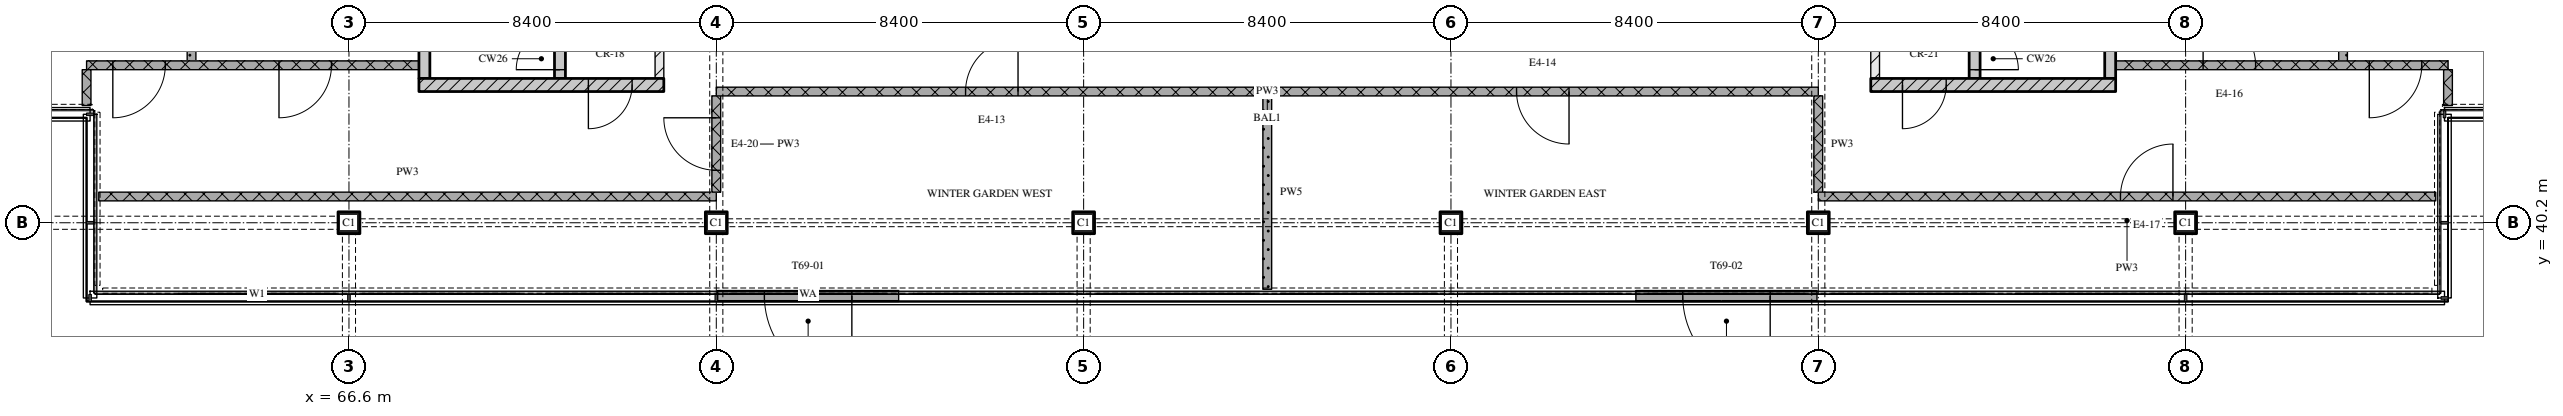
"""IFC4 building model, lengths in metres.
Left out: names, types, materials, properties, quantities, classifications, styles, units other than length and angle.
Written with IfcOpenShell. Run it as: python <this file> out.ifc"""

import sys

from ifc_helpers import new_model, si_unit, direction, frame, frame_2d, origin, origin_2d, place, context, subcontext, project, spatial, rectangle, extrude, element, fill, save


model = new_model("IFC4")
c1 = context("Model", 3, precision=1e-05, world=origin(), true_north=direction((0.0, 1.0)))
c2 = subcontext(c1, "Body", "Model", "MODEL_VIEW")
j1 = project(units=[si_unit("LENGTHUNIT", "METRE"), si_unit("PLANEANGLEUNIT", "RADIAN")], contexts=[c1])
p1 = place(None, origin())
s1 = spatial("IfcSite", under=j1, at=p1, CompositionType="ELEMENT")
p2 = place(p1, origin())
s2 = spatial("IfcBuilding", under=s1, at=p2, CompositionType="ELEMENT")
p3 = place(p2, frame((0.0, 0.0, 285.15)))
s3 = spatial("IfcBuildingStorey", under=s2, at=p3, CompositionType="ELEMENT", Elevation=285.15)
for number, where, z_axis, x_axis in (
    (1, (66.6, 40.2, 0.0), (0.0, 0.0, 1.0), (1.0, 0.0, 0.0)),
    (2, (75.0, 40.2, 0.0), (0.0, 0.0, 1.0), (1.0, 0.0, 0.0)),
    (3, (83.4, 40.2, 0.0), (0.0, 0.0, 1.0), (1.0, 0.0, 0.0)),
    (4, (91.8, 40.2, 0.0), (0.0, 0.0, 1.0), (1.0, 0.0, 0.0)),
    (5, (100.2, 40.2, 0.0), (0.0, 0.0, 1.0), (1.0, 0.0, 0.0)),
    (6, (108.6, 40.2, 0.0), (0.0, 0.0, 1.0), (1.0, 0.0, 0.0)),
):
    element("IfcColumn", number, at=place(p3, frame(where, z_axis=z_axis, x_axis=x_axis)), inside=s3, PredefinedType="COLUMN", context=c2, shape_type="SweptSolid", body=[
        extrude(rectangle(XDim=0.5, YDim=0.5, at=origin_2d()), origin(), (0.0, 0.0, 1.0), 3.6),
    ])
p4 = place(p3, frame((79.17, 38.525, 0.0), z_axis=(0.0, 0.0, 1.0), x_axis=(-1.0, 0.0, 0.0)))
e7 = element("IfcWall", 7, at=p4, inside=s3, PredefinedType="SOLIDWALL", context=c2, shape_type="SweptSolid", body=[
    extrude(rectangle(XDim=4.14, YDim=0.25, at=frame_2d((2.07, 0.0))), origin(), (0.0, 0.0, 1.0), 3.32),
])
p5 = place(p4, frame((1.07, 0.0, 0.0)))
e8 = element("IfcOpeningElement", 8, at=p5, cuts=e7, PredefinedType="OPENING", context=c2, shape_type="SweptSolid", body=[
    extrude(rectangle(XDim=2.0, YDim=2.4, at=frame_2d((1.0, 1.2))), frame((0.0, 0.135, 0.0), z_axis=(0.0, -1.0, 0.0), x_axis=(1.0, 0.0, 0.0)), (0.0, 0.0, 1.0), 0.27),
])
p6 = place(p3, frame((100.17, 38.525, 0.0), z_axis=(0.0, 0.0, 1.0), x_axis=(-1.0, 0.0, 0.0)))
e9 = element("IfcWall", 9, at=p6, inside=s3, PredefinedType="SOLIDWALL", context=c2, shape_type="SweptSolid", body=[
    extrude(rectangle(XDim=4.14, YDim=0.25, at=frame_2d((2.07, 0.0))), origin(), (0.0, 0.0, 1.0), 3.32),
])
p7 = place(p6, frame((1.07, 0.0, 0.0)))
e10 = element("IfcOpeningElement", 10, at=p7, cuts=e9, PredefinedType="OPENING", context=c2, shape_type="SweptSolid", body=[
    extrude(rectangle(XDim=2.0, YDim=2.4, at=frame_2d((1.0, 1.2))), frame((0.0, 0.135, 0.0), z_axis=(0.0, -1.0, 0.0), x_axis=(1.0, 0.0, 0.0)), (0.0, 0.0, 1.0), 0.27),
])
p8 = place(p3, frame((68.2, 43.35, 0.0), z_axis=(0.0, 0.0, 1.0), x_axis=(1.0, 0.0, 0.0)))
e11 = element("IfcWall", 11, at=p8, inside=s3, PredefinedType="SOLIDWALL", context=c2, shape_type="SweptSolid", body=[
    extrude(rectangle(XDim=5.6, YDim=0.3, at=frame_2d((2.8, 0.0))), origin(), (0.0, 0.0, 1.0), 3.32),
])
p9 = place(p8, frame((3.875, 0.0, 0.0)))
e12 = element("IfcOpeningElement", 12, at=p9, cuts=e11, PredefinedType="OPENING", context=c2, shape_type="SweptSolid", body=[
    extrude(rectangle(XDim=1.0, YDim=2.1, at=frame_2d((0.5, 1.05))), frame((0.0, 0.16, 0.0), z_axis=(0.0, -1.0, 0.0), x_axis=(1.0, 0.0, 0.0)), (0.0, 0.0, 1.0), 0.32),
])
p10 = place(p3, frame((68.325, 43.5, 0.0), z_axis=(0.0, 0.0, 1.0), x_axis=(0.0, 1.0, 0.0)))
e13 = element("IfcWall", 13, at=p10, inside=s3, PredefinedType="SOLIDWALL", context=c2, shape_type="SweptSolid", body=[
    extrude(rectangle(XDim=6.9, YDim=0.25, at=frame_2d((3.45, 0.0))), origin(), (0.0, 0.0, 1.0), 3.32),
])
p11 = place(p3, frame((71.425, 43.5, 0.0), z_axis=(0.0, 0.0, 1.0), x_axis=(0.0, 1.0, 0.0)))
e14 = element("IfcWall", 14, at=p11, inside=s3, PredefinedType="SOLIDWALL", context=c2, shape_type="SweptSolid", body=[
    extrude(rectangle(XDim=6.9, YDim=0.25, at=frame_2d((3.45, 0.0))), origin(), (0.0, 0.0, 1.0), 3.32),
])
p12 = place(p11, frame((0.2, 0.0, 0.0)))
e15 = element("IfcOpeningElement", 15, at=p12, cuts=e14, PredefinedType="OPENING", context=c2, shape_type="SweptSolid", body=[
    extrude(rectangle(XDim=1.0, YDim=2.1, at=frame_2d((0.5, 1.05))), frame((0.0, 0.135, 0.0), z_axis=(0.0, -1.0, 0.0), x_axis=(1.0, 0.0, 0.0)), (0.0, 0.0, 1.0), 0.27),
])
p13 = place(p3, frame((73.7, 43.5, 0.0), z_axis=(0.0, 0.0, 1.0), x_axis=(0.0, 1.0, 0.0)))
e16 = element("IfcWall", 16, at=p13, inside=s3, PredefinedType="PARTITIONING", context=c2, shape_type="SweptSolid", body=[
    extrude(rectangle(XDim=6.9, YDim=0.2, at=frame_2d((3.45, 0.0))), origin(), (0.0, 0.0, 1.0), 3.32),
])
p14 = place(p13, frame((1.0, 0.0, 0.0)))
e17 = element("IfcOpeningElement", 17, at=p14, cuts=e16, PredefinedType="OPENING", context=c2, shape_type="SweptSolid", body=[
    extrude(rectangle(XDim=1.0, YDim=2.1, at=frame_2d((0.5, 1.05))), frame((0.0, 0.11, 0.0), z_axis=(0.0, -1.0, 0.0), x_axis=(1.0, 0.0, 0.0)), (0.0, 0.0, 1.0), 0.22),
])
p15 = place(p3, frame((101.4, 43.35, 0.0), z_axis=(0.0, 0.0, 1.0), x_axis=(1.0, 0.0, 0.0)))
e18 = element("IfcWall", 18, at=p15, inside=s3, PredefinedType="SOLIDWALL", context=c2, shape_type="SweptSolid", body=[
    extrude(rectangle(XDim=5.6, YDim=0.3, at=frame_2d((2.8, 0.0))), origin(), (0.0, 0.0, 1.0), 3.32),
])
p16 = place(p15, frame((0.725, 0.0, 0.0)))
e19 = element("IfcOpeningElement", 19, at=p16, cuts=e18, PredefinedType="OPENING", context=c2, shape_type="SweptSolid", body=[
    extrude(rectangle(XDim=1.0, YDim=2.1, at=frame_2d((0.5, 1.05))), frame((0.0, 0.16, 0.0), z_axis=(0.0, -1.0, 0.0), x_axis=(1.0, 0.0, 0.0)), (0.0, 0.0, 1.0), 0.32),
])
p17 = place(p3, frame((101.5, 43.5, 0.0), z_axis=(0.0, 0.0, 1.0), x_axis=(0.0, 1.0, 0.0)))
e20 = element("IfcWall", 20, at=p17, inside=s3, PredefinedType="PARTITIONING", context=c2, shape_type="SweptSolid", body=[
    extrude(rectangle(XDim=6.9, YDim=0.2, at=frame_2d((3.45, 0.0))), origin(), (0.0, 0.0, 1.0), 3.32),
])
p18 = place(p17, frame((1.0, 0.0, 0.0)))
e21 = element("IfcOpeningElement", 21, at=p18, cuts=e20, PredefinedType="OPENING", context=c2, shape_type="SweptSolid", body=[
    extrude(rectangle(XDim=1.0, YDim=2.1, at=frame_2d((0.5, 1.05))), frame((0.0, 0.11, 0.0), z_axis=(0.0, -1.0, 0.0), x_axis=(1.0, 0.0, 0.0)), (0.0, 0.0, 1.0), 0.22),
])
p19 = place(p3, frame((103.775, 43.5, 0.0), z_axis=(0.0, 0.0, 1.0), x_axis=(0.0, 1.0, 0.0)))
e22 = element("IfcWall", 22, at=p19, inside=s3, PredefinedType="SOLIDWALL", context=c2, shape_type="SweptSolid", body=[
    extrude(rectangle(XDim=6.9, YDim=0.25, at=frame_2d((3.45, 0.0))), origin(), (0.0, 0.0, 1.0), 3.32),
])
p20 = place(p19, frame((0.2, 0.0, 0.0)))
e23 = element("IfcOpeningElement", 23, at=p20, cuts=e22, PredefinedType="OPENING", context=c2, shape_type="SweptSolid", body=[
    extrude(rectangle(XDim=1.0, YDim=2.1, at=frame_2d((0.5, 1.05))), frame((0.0, 0.135, 0.0), z_axis=(0.0, -1.0, 0.0), x_axis=(1.0, 0.0, 0.0)), (0.0, 0.0, 1.0), 0.27),
])
p21 = place(p3, frame((106.875, 43.5, 0.0), z_axis=(0.0, 0.0, 1.0), x_axis=(0.0, 1.0, 0.0)))
e24 = element("IfcWall", 24, at=p21, inside=s3, PredefinedType="SOLIDWALL", context=c2, shape_type="SweptSolid", body=[
    extrude(rectangle(XDim=6.9, YDim=0.25, at=frame_2d((3.45, 0.0))), origin(), (0.0, 0.0, 1.0), 3.32),
])
p22 = place(p3, frame((60.88, 40.8, 0.0), z_axis=(0.0, 0.0, 1.0), x_axis=(1.0, 0.0, 0.0)))
e25 = element("IfcWall", 25, at=p22, inside=s3, PredefinedType="PARTITIONING", context=c2, shape_type="SweptSolid", body=[
    extrude(rectangle(XDim=14.12, YDim=0.2, at=frame_2d((7.06, 0.0))), origin(), (0.0, 0.0, 1.0), 3.32),
])
p23 = place(p3, frame((114.32, 40.8, 0.0), z_axis=(0.0, 0.0, 1.0), x_axis=(-1.0, 0.0, 0.0)))
e26 = element("IfcWall", 26, at=p23, inside=s3, PredefinedType="PARTITIONING", context=c2, shape_type="SweptSolid", body=[
    extrude(rectangle(XDim=14.12, YDim=0.2, at=frame_2d((7.06, 0.0))), origin(), (0.0, 0.0, 1.0), 3.32),
])
p24 = place(p23, frame((6.01, 0.0, 0.0)))
e27 = element("IfcOpeningElement", 27, at=p24, cuts=e26, PredefinedType="OPENING", context=c2, shape_type="SweptSolid", body=[
    extrude(rectangle(XDim=1.2, YDim=2.1, at=frame_2d((0.6, 1.05))), frame((0.0, 0.11, 0.0), z_axis=(0.0, -1.0, 0.0), x_axis=(1.0, 0.0, 0.0)), (0.0, 0.0, 1.0), 0.22),
])
p25 = place(p3, frame((100.2, 43.2, 0.0), z_axis=(0.0, 0.0, 1.0), x_axis=(-1.0, 0.0, 0.0)))
e28 = element("IfcWall", 28, at=p25, inside=s3, PredefinedType="PARTITIONING", context=c2, shape_type="SweptSolid", body=[
    extrude(rectangle(XDim=25.2, YDim=0.2, at=frame_2d((12.6, 0.0))), origin(), (0.0, 0.0, 1.0), 3.32),
])
p26 = place(p25, frame((5.7, 0.0, 0.0)))
e29 = element("IfcOpeningElement", 29, at=p26, cuts=e28, PredefinedType="OPENING", context=c2, shape_type="SweptSolid", body=[
    extrude(rectangle(XDim=1.2, YDim=2.1, at=frame_2d((0.6, 1.05))), frame((0.0, 0.11, 0.0), z_axis=(0.0, -1.0, 0.0), x_axis=(1.0, 0.0, 0.0)), (0.0, 0.0, 1.0), 0.22),
])
p27 = place(p25, frame((18.3, 0.0, 0.0)))
e30 = element("IfcOpeningElement", 30, at=p27, cuts=e28, PredefinedType="OPENING", context=c2, shape_type="SweptSolid", body=[
    extrude(rectangle(XDim=1.2, YDim=2.1, at=frame_2d((0.6, 1.05))), frame((0.0, 0.11, 0.0), z_axis=(0.0, -1.0, 0.0), x_axis=(1.0, 0.0, 0.0)), (0.0, 0.0, 1.0), 0.22),
])
p28 = place(p3, frame((60.6, 43.8, 0.0), z_axis=(0.0, 0.0, 1.0), x_axis=(1.0, 0.0, 0.0)))
e31 = element("IfcWall", 31, at=p28, inside=s3, PredefinedType="PARTITIONING", context=c2, shape_type="SweptSolid", body=[
    extrude(rectangle(XDim=7.6, YDim=0.2, at=frame_2d((3.8, 0.0))), origin(), (0.0, 0.0, 1.0), 3.32),
])
p29 = place(p28, frame((0.6, 0.0, 0.0)))
e32 = element("IfcOpeningElement", 32, at=p29, cuts=e31, PredefinedType="OPENING", context=c2, shape_type="SweptSolid", body=[
    extrude(rectangle(XDim=1.2, YDim=2.1, at=frame_2d((0.6, 1.05))), frame((0.0, 0.11, 0.0), z_axis=(0.0, -1.0, 0.0), x_axis=(1.0, 0.0, 0.0)), (0.0, 0.0, 1.0), 0.22),
])
p30 = place(p28, frame((4.4, 0.0, 0.0)))
e33 = element("IfcOpeningElement", 33, at=p30, cuts=e31, PredefinedType="OPENING", context=c2, shape_type="SweptSolid", body=[
    extrude(rectangle(XDim=1.2, YDim=2.1, at=frame_2d((0.6, 1.05))), frame((0.0, 0.11, 0.0), z_axis=(0.0, -1.0, 0.0), x_axis=(1.0, 0.0, 0.0)), (0.0, 0.0, 1.0), 0.22),
])
p31 = place(p3, frame((107.0, 43.8, 0.0), z_axis=(0.0, 0.0, 1.0), x_axis=(1.0, 0.0, 0.0)))
e34 = element("IfcWall", 34, at=p31, inside=s3, PredefinedType="PARTITIONING", context=c2, shape_type="SweptSolid", body=[
    extrude(rectangle(XDim=7.6, YDim=0.2, at=frame_2d((3.8, 0.0))), origin(), (0.0, 0.0, 1.0), 3.32),
])
p32 = place(p31, frame((2.0, 0.0, 0.0)))
e35 = element("IfcOpeningElement", 35, at=p32, cuts=e34, PredefinedType="OPENING", context=c2, shape_type="SweptSolid", body=[
    extrude(rectangle(XDim=1.2, YDim=2.1, at=frame_2d((0.6, 1.05))), frame((0.0, 0.11, 0.0), z_axis=(0.0, -1.0, 0.0), x_axis=(1.0, 0.0, 0.0)), (0.0, 0.0, 1.0), 0.22),
])
p33 = place(p31, frame((5.8, 0.0, 0.0)))
e36 = element("IfcOpeningElement", 36, at=p33, cuts=e34, PredefinedType="OPENING", context=c2, shape_type="SweptSolid", body=[
    extrude(rectangle(XDim=1.2, YDim=2.1, at=frame_2d((0.6, 1.05))), frame((0.0, 0.11, 0.0), z_axis=(0.0, -1.0, 0.0), x_axis=(1.0, 0.0, 0.0)), (0.0, 0.0, 1.0), 0.22),
])
p34 = place(p3, frame((60.6, 43.7, 0.0), z_axis=(0.0, 0.0, 1.0), x_axis=(0.0, -1.0, 0.0)))
e37 = element("IfcWall", 37, at=p34, inside=s3, PredefinedType="PARTITIONING", context=c2, shape_type="SweptSolid", body=[
    extrude(rectangle(XDim=0.82, YDim=0.2, at=frame_2d((0.41, 0.0))), origin(), (0.0, 0.0, 1.0), 3.32),
])
p35 = place(p3, frame((63.0, 52.4, 0.0), z_axis=(0.0, 0.0, 1.0), x_axis=(0.0, -1.0, 0.0)))
e38 = element("IfcWall", 38, at=p35, inside=s3, PredefinedType="PARTITIONING", context=c2, shape_type="SweptSolid", body=[
    extrude(rectangle(XDim=8.5, YDim=0.2, at=frame_2d((4.25, 0.0))), origin(), (0.0, 0.0, 1.0), 3.32),
])
p36 = place(p3, frame((75.0, 43.1, 0.0), z_axis=(0.0, 0.0, 1.0), x_axis=(0.0, -1.0, 0.0)))
e39 = element("IfcWall", 39, at=p36, inside=s3, PredefinedType="PARTITIONING", context=c2, shape_type="SweptSolid", body=[
    extrude(rectangle(XDim=2.2, YDim=0.2, at=frame_2d((1.1, 0.0))), origin(), (0.0, 0.0, 1.0), 2.53),
])
p37 = place(p36, frame((0.5, 0.0, 0.0)))
e40 = element("IfcOpeningElement", 40, at=p37, cuts=e39, PredefinedType="OPENING", context=c2, shape_type="SweptSolid", body=[
    extrude(rectangle(XDim=1.2, YDim=2.1, at=frame_2d((0.6, 1.05))), frame((0.0, 0.11, 0.0), z_axis=(0.0, -1.0, 0.0), x_axis=(1.0, 0.0, 0.0)), (0.0, 0.0, 1.0), 0.22),
])
p38 = place(p3, frame((87.6, 43.1, 0.0), z_axis=(0.0, 0.0, 1.0), x_axis=(0.0, -1.0, 0.0)))
e41 = element("IfcWall", 41, at=p38, inside=s3, PredefinedType="PARTITIONING", context=c2, shape_type="SweptSolid", body=[
    extrude(rectangle(XDim=4.42, YDim=0.2, at=frame_2d((2.21, 0.0))), origin(), (0.0, 0.0, 1.0), 3.32),
])
p39 = place(p3, frame((100.2, 43.1, 0.0), z_axis=(0.0, 0.0, 1.0), x_axis=(0.0, -1.0, 0.0)))
e42 = element("IfcWall", 42, at=p39, inside=s3, PredefinedType="PARTITIONING", context=c2, shape_type="SweptSolid", body=[
    extrude(rectangle(XDim=2.2, YDim=0.2, at=frame_2d((1.1, 0.0))), origin(), (0.0, 0.0, 1.0), 2.53),
])
p40 = place(p3, frame((112.2, 52.4, 0.0), z_axis=(0.0, 0.0, 1.0), x_axis=(0.0, -1.0, 0.0)))
e43 = element("IfcWall", 43, at=p40, inside=s3, PredefinedType="PARTITIONING", context=c2, shape_type="SweptSolid", body=[
    extrude(rectangle(XDim=8.5, YDim=0.2, at=frame_2d((4.25, 0.0))), origin(), (0.0, 0.0, 1.0), 3.32),
])
p41 = place(p3, frame((114.6, 43.7, 0.0), z_axis=(0.0, 0.0, 1.0), x_axis=(0.0, -1.0, 0.0)))
e44 = element("IfcWall", 44, at=p41, inside=s3, PredefinedType="PARTITIONING", context=c2, shape_type="SweptSolid", body=[
    extrude(rectangle(XDim=0.82, YDim=0.2, at=frame_2d((0.41, 0.0))), origin(), (0.0, 0.0, 1.0), 3.32),
])
p42 = place(p5, origin())
e45 = element("IfcDoor", 45, at=p42, inside=s3, OperationType="DOUBLE_DOOR_SINGLE_SWING", PredefinedType="DOOR", context=c2, shape_type="SweptSolid", body=[
    extrude(rectangle(XDim=2.0, YDim=2.4, at=frame_2d((1.0, 1.2))), frame((0.0, 0.025, 0.0), z_axis=(0.0, -1.0, 0.0), x_axis=(1.0, 0.0, 0.0)), (0.0, 0.0, 1.0), 0.05),
])
fill(e8, e45)
p43 = place(p7, origin())
e46 = element("IfcDoor", 46, at=p43, inside=s3, OperationType="DOUBLE_DOOR_SINGLE_SWING", PredefinedType="DOOR", context=c2, shape_type="SweptSolid", body=[
    extrude(rectangle(XDim=2.0, YDim=2.4, at=frame_2d((1.0, 1.2))), frame((0.0, 0.025, 0.0), z_axis=(0.0, -1.0, 0.0), x_axis=(1.0, 0.0, 0.0)), (0.0, 0.0, 1.0), 0.05),
])
fill(e10, e46)
p44 = place(p9, origin())
e47 = element("IfcDoor", 47, at=p44, inside=s3, OperationType="SINGLE_SWING_RIGHT", PredefinedType="DOOR", context=c2, shape_type="SweptSolid", body=[
    extrude(rectangle(XDim=1.0, YDim=2.1, at=frame_2d((0.5, 1.05))), frame((0.0, 0.025, 0.0), z_axis=(0.0, -1.0, 0.0), x_axis=(1.0, 0.0, 0.0)), (0.0, 0.0, 1.0), 0.05),
])
fill(e12, e47)
p45 = place(p12, origin())
e48 = element("IfcDoor", 48, at=p45, inside=s3, OperationType="SINGLE_SWING_LEFT", PredefinedType="DOOR", context=c2, shape_type="SweptSolid", body=[
    extrude(rectangle(XDim=1.0, YDim=2.1, at=frame_2d((0.5, 1.05))), frame((0.0, 0.025, 0.0), z_axis=(0.0, -1.0, 0.0), x_axis=(1.0, 0.0, 0.0)), (0.0, 0.0, 1.0), 0.05),
])
fill(e15, e48)
p46 = place(p16, origin())
e49 = element("IfcDoor", 49, at=p46, inside=s3, OperationType="SINGLE_SWING_RIGHT", PredefinedType="DOOR", context=c2, shape_type="SweptSolid", body=[
    extrude(rectangle(XDim=1.0, YDim=2.1, at=frame_2d((0.5, 1.05))), frame((0.0, 0.025, 0.0), z_axis=(0.0, -1.0, 0.0), x_axis=(1.0, 0.0, 0.0)), (0.0, 0.0, 1.0), 0.05),
])
fill(e19, e49)
p47 = place(p20, origin())
e50 = element("IfcDoor", 50, at=p47, inside=s3, OperationType="SINGLE_SWING_RIGHT", PredefinedType="DOOR", context=c2, shape_type="SweptSolid", body=[
    extrude(rectangle(XDim=1.0, YDim=2.1, at=frame_2d((0.5, 1.05))), frame((0.0, 0.025, 0.0), z_axis=(0.0, -1.0, 0.0), x_axis=(1.0, 0.0, 0.0)), (0.0, 0.0, 1.0), 0.05),
])
fill(e23, e50)
p48 = place(p24, origin())
e51 = element("IfcDoor", 51, at=p48, inside=s3, OperationType="SINGLE_SWING_RIGHT", PredefinedType="DOOR", context=c2, shape_type="SweptSolid", body=[
    extrude(rectangle(XDim=1.2, YDim=2.1, at=frame_2d((0.6, 1.05))), frame((0.0, 0.025, 0.0), z_axis=(0.0, -1.0, 0.0), x_axis=(1.0, 0.0, 0.0)), (0.0, 0.0, 1.0), 0.05),
])
fill(e27, e51)
p49 = place(p26, origin())
e52 = element("IfcDoor", 52, at=p49, inside=s3, OperationType="SINGLE_SWING_LEFT", PredefinedType="DOOR", context=c2, shape_type="SweptSolid", body=[
    extrude(rectangle(XDim=1.2, YDim=2.1, at=frame_2d((0.6, 1.05))), frame((0.0, 0.025, 0.0), z_axis=(0.0, -1.0, 0.0), x_axis=(1.0, 0.0, 0.0)), (0.0, 0.0, 1.0), 0.05),
])
fill(e29, e52)
p50 = place(p27, origin())
e53 = element("IfcDoor", 53, at=p50, inside=s3, OperationType="SINGLE_SWING_RIGHT", PredefinedType="DOOR", context=c2, shape_type="SweptSolid", body=[
    extrude(rectangle(XDim=1.2, YDim=2.1, at=frame_2d((0.6, 1.05))), frame((0.0, 0.025, 0.0), z_axis=(0.0, -1.0, 0.0), x_axis=(1.0, 0.0, 0.0)), (0.0, 0.0, 1.0), 0.05),
])
fill(e30, e53)
p51 = place(p29, origin())
e54 = element("IfcDoor", 54, at=p51, inside=s3, OperationType="SINGLE_SWING_RIGHT", PredefinedType="DOOR", context=c2, shape_type="SweptSolid", body=[
    extrude(rectangle(XDim=1.2, YDim=2.1, at=frame_2d((0.6, 1.05))), frame((0.0, 0.025, 0.0), z_axis=(0.0, -1.0, 0.0), x_axis=(1.0, 0.0, 0.0)), (0.0, 0.0, 1.0), 0.05),
])
fill(e32, e54)
p52 = place(p30, origin())
e55 = element("IfcDoor", 55, at=p52, inside=s3, OperationType="SINGLE_SWING_RIGHT", PredefinedType="DOOR", context=c2, shape_type="SweptSolid", body=[
    extrude(rectangle(XDim=1.2, YDim=2.1, at=frame_2d((0.6, 1.05))), frame((0.0, 0.025, 0.0), z_axis=(0.0, -1.0, 0.0), x_axis=(1.0, 0.0, 0.0)), (0.0, 0.0, 1.0), 0.05),
])
fill(e33, e55)
p53 = place(p32, origin())
e56 = element("IfcDoor", 56, at=p53, inside=s3, OperationType="SINGLE_SWING_LEFT", PredefinedType="DOOR", context=c2, shape_type="SweptSolid", body=[
    extrude(rectangle(XDim=1.2, YDim=2.1, at=frame_2d((0.6, 1.05))), frame((0.0, 0.025, 0.0), z_axis=(0.0, -1.0, 0.0), x_axis=(1.0, 0.0, 0.0)), (0.0, 0.0, 1.0), 0.05),
])
fill(e35, e56)
p54 = place(p33, origin())
e57 = element("IfcDoor", 57, at=p54, inside=s3, OperationType="SINGLE_SWING_RIGHT", PredefinedType="DOOR", context=c2, shape_type="SweptSolid", body=[
    extrude(rectangle(XDim=1.2, YDim=2.1, at=frame_2d((0.6, 1.05))), frame((0.0, 0.025, 0.0), z_axis=(0.0, -1.0, 0.0), x_axis=(1.0, 0.0, 0.0)), (0.0, 0.0, 1.0), 0.05),
])
fill(e36, e57)
p55 = place(p37, origin())
e58 = element("IfcDoor", 58, at=p55, inside=s3, OperationType="SINGLE_SWING_RIGHT", PredefinedType="DOOR", context=c2, shape_type="SweptSolid", body=[
    extrude(rectangle(XDim=1.2, YDim=2.1, at=frame_2d((0.6, 1.05))), frame((0.0, 0.025, 0.0), z_axis=(0.0, -1.0, 0.0), x_axis=(1.0, 0.0, 0.0)), (0.0, 0.0, 1.0), 0.05),
])
fill(e40, e58)
save(model, sys.argv[1])
